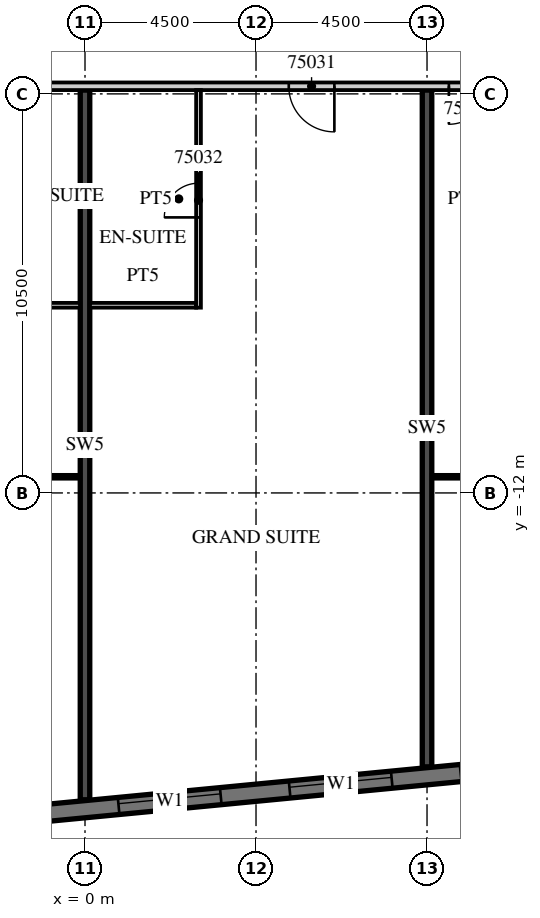
"""IFC4 building model, lengths in metres.
Left out: names, types, materials, properties, quantities, classifications, styles, units other than length and angle.
Written with IfcOpenShell. Run it as: python <this file> out.ifc"""

import sys

from ifc_helpers import new_model, si_unit, direction, frame, frame_2d, origin, place, context, subcontext, project, spatial, rectangle, extrude, element, fill, save


model = new_model("IFC4")
c1 = context("Model", 3, precision=1e-05, world=origin(), true_north=direction((0.0, 1.0)))
c2 = subcontext(c1, "Body", "Model", "MODEL_VIEW")
j1 = project(units=[si_unit("LENGTHUNIT", "METRE"), si_unit("PLANEANGLEUNIT", "RADIAN")], contexts=[c1])
p1 = place(None, origin())
s1 = spatial("IfcSite", under=j1, at=p1, CompositionType="ELEMENT")
p2 = place(p1, origin())
s2 = spatial("IfcBuilding", under=s1, at=p2, CompositionType="ELEMENT")
p3 = place(p2, frame((0.0, 0.0, 298.2)))
s3 = spatial("IfcBuildingStorey", under=s2, at=p3, CompositionType="ELEMENT", Elevation=298.2)
p4 = place(p3, frame((0.0, -20.074, 0.0), z_axis=(0.0, 0.0, 1.0), x_axis=(0.0, 1.0, 0.0)))
e1 = element("IfcWall", 1, at=p4, inside=s3, PredefinedType="SHEAR", context=c2, shape_type="SweptSolid", body=[
    extrude(rectangle(XDim=18.674, YDim=0.25, at=frame_2d((9.337, 0.0))), origin(), (0.0, 0.0, 1.0), 3.3),
])
p5 = place(p3, frame((9.0, -19.207, 0.0), z_axis=(0.0, 0.0, 1.0), x_axis=(0.0, 1.0, 0.0)))
e2 = element("IfcWall", 2, at=p5, inside=s3, PredefinedType="SHEAR", context=c2, shape_type="SweptSolid", body=[
    extrude(rectangle(XDim=17.807, YDim=0.25, at=frame_2d((8.904, 0.0))), origin(), (0.0, 0.0, 1.0), 3.3),
])
p6 = place(p3, frame((-13.521, -21.624, 0.0), z_axis=(0.0, 0.0, 1.0), x_axis=(0.995396186218, 0.095845878695, 0.0)))
e3 = element("IfcWall", 3, at=p6, inside=s3, PredefinedType="SOLIDWALL", context=c2, shape_type="SweptSolid", body=[
    extrude(rectangle(XDim=48.481, YDim=0.45, at=frame_2d((24.241, 0.0))), origin(), (0.0, 0.0, 1.0), 3.02),
])
p7 = place(p6, frame((0.91, 0.0, 0.45)))
e4 = element("IfcOpeningElement", 4, at=p7, cuts=e3, PredefinedType="OPENING", context=c2, shape_type="SweptSolid", body=[
    extrude(rectangle(XDim=2.7, YDim=2.25, at=frame_2d((1.35, 1.125))), frame((0.0, 0.235, 0.0), z_axis=(0.0, -1.0, 0.0), x_axis=(1.0, 0.0, 0.0)), (0.0, 0.0, 1.0), 0.47),
])
p8 = place(p6, frame((5.431, 0.0, 0.45)))
e5 = element("IfcOpeningElement", 5, at=p8, cuts=e3, PredefinedType="OPENING", context=c2, shape_type="SweptSolid", body=[
    extrude(rectangle(XDim=2.7, YDim=2.25, at=frame_2d((1.35, 1.125))), frame((0.0, 0.235, 0.0), z_axis=(0.0, -1.0, 0.0), x_axis=(1.0, 0.0, 0.0)), (0.0, 0.0, 1.0), 0.47),
])
p9 = place(p6, frame((9.952, 0.0, 0.45)))
e6 = element("IfcOpeningElement", 6, at=p9, cuts=e3, PredefinedType="OPENING", context=c2, shape_type="SweptSolid", body=[
    extrude(rectangle(XDim=2.7, YDim=2.25, at=frame_2d((1.35, 1.125))), frame((0.0, 0.235, 0.0), z_axis=(0.0, -1.0, 0.0), x_axis=(1.0, 0.0, 0.0)), (0.0, 0.0, 1.0), 0.47),
])
p10 = place(p6, frame((14.473, 0.0, 0.45)))
e7 = element("IfcOpeningElement", 7, at=p10, cuts=e3, PredefinedType="OPENING", context=c2, shape_type="SweptSolid", body=[
    extrude(rectangle(XDim=2.7, YDim=2.25, at=frame_2d((1.35, 1.125))), frame((0.0, 0.235, 0.0), z_axis=(0.0, -1.0, 0.0), x_axis=(1.0, 0.0, 0.0)), (0.0, 0.0, 1.0), 0.47),
])
p11 = place(p6, frame((18.994, 0.0, 0.45)))
e8 = element("IfcOpeningElement", 8, at=p11, cuts=e3, PredefinedType="OPENING", context=c2, shape_type="SweptSolid", body=[
    extrude(rectangle(XDim=2.7, YDim=2.25, at=frame_2d((1.35, 1.125))), frame((0.0, 0.235, 0.0), z_axis=(0.0, -1.0, 0.0), x_axis=(1.0, 0.0, 0.0)), (0.0, 0.0, 1.0), 0.47),
])
p12 = place(p6, frame((23.514, 0.0, 0.45)))
e9 = element("IfcOpeningElement", 9, at=p12, cuts=e3, PredefinedType="OPENING", context=c2, shape_type="SweptSolid", body=[
    extrude(rectangle(XDim=2.7, YDim=2.25, at=frame_2d((1.35, 1.125))), frame((0.0, 0.235, 0.0), z_axis=(0.0, -1.0, 0.0), x_axis=(1.0, 0.0, 0.0)), (0.0, 0.0, 1.0), 0.47),
])
p13 = place(p6, frame((28.035, 0.0, 0.45)))
e10 = element("IfcOpeningElement", 10, at=p13, cuts=e3, PredefinedType="OPENING", context=c2, shape_type="SweptSolid", body=[
    extrude(rectangle(XDim=2.7, YDim=2.25, at=frame_2d((1.35, 1.125))), frame((0.0, 0.235, 0.0), z_axis=(0.0, -1.0, 0.0), x_axis=(1.0, 0.0, 0.0)), (0.0, 0.0, 1.0), 0.47),
])
p14 = place(p6, frame((32.556, 0.0, 0.45)))
e11 = element("IfcOpeningElement", 11, at=p14, cuts=e3, PredefinedType="OPENING", context=c2, shape_type="SweptSolid", body=[
    extrude(rectangle(XDim=2.7, YDim=2.25, at=frame_2d((1.35, 1.125))), frame((0.0, 0.235, 0.0), z_axis=(0.0, -1.0, 0.0), x_axis=(1.0, 0.0, 0.0)), (0.0, 0.0, 1.0), 0.47),
])
p15 = place(p6, frame((37.077, 0.0, 0.45)))
e12 = element("IfcOpeningElement", 12, at=p15, cuts=e3, PredefinedType="OPENING", context=c2, shape_type="SweptSolid", body=[
    extrude(rectangle(XDim=2.7, YDim=2.25, at=frame_2d((1.35, 1.125))), frame((0.0, 0.235, 0.0), z_axis=(0.0, -1.0, 0.0), x_axis=(1.0, 0.0, 0.0)), (0.0, 0.0, 1.0), 0.47),
])
p16 = place(p6, frame((41.598, 0.0, 0.45)))
e13 = element("IfcOpeningElement", 13, at=p16, cuts=e3, PredefinedType="OPENING", context=c2, shape_type="SweptSolid", body=[
    extrude(rectangle(XDim=2.7, YDim=2.25, at=frame_2d((1.35, 1.125))), frame((0.0, 0.235, 0.0), z_axis=(0.0, -1.0, 0.0), x_axis=(1.0, 0.0, 0.0)), (0.0, 0.0, 1.0), 0.47),
])
p17 = place(p3, frame((-13.5, -1.3, 0.0), z_axis=(0.0, 0.0, 1.0), x_axis=(1.0, 0.0, 0.0)))
e14 = element("IfcWall", 14, at=p17, inside=s3, PredefinedType="PARTITIONING", context=c2, shape_type="SweptSolid", body=[
    extrude(rectangle(XDim=50.293, YDim=0.2, at=frame_2d((25.146, 0.0))), origin(), (0.0, 0.0, 1.0), 3.02),
])
p18 = place(p17, frame((2.925, 0.0, 0.0)))
e15 = element("IfcOpeningElement", 15, at=p18, cuts=e14, PredefinedType="OPENING", context=c2, shape_type="SweptSolid", body=[
    extrude(rectangle(XDim=1.0, YDim=2.1, at=frame_2d((0.5, 1.05))), frame((0.0, 0.11, 0.0), z_axis=(0.0, -1.0, 0.0), x_axis=(1.0, 0.0, 0.0)), (0.0, 0.0, 1.0), 0.22),
])
p19 = place(p17, frame((7.45, 0.0, 0.0)))
e16 = element("IfcOpeningElement", 16, at=p19, cuts=e14, PredefinedType="OPENING", context=c2, shape_type="SweptSolid", body=[
    extrude(rectangle(XDim=1.0, YDim=2.1, at=frame_2d((0.5, 1.05))), frame((0.0, 0.11, 0.0), z_axis=(0.0, -1.0, 0.0), x_axis=(1.0, 0.0, 0.0)), (0.0, 0.0, 1.0), 0.22),
])
p20 = place(p17, frame((9.55, 0.0, 0.0)))
e17 = element("IfcOpeningElement", 17, at=p20, cuts=e14, PredefinedType="OPENING", context=c2, shape_type="SweptSolid", body=[
    extrude(rectangle(XDim=1.0, YDim=2.1, at=frame_2d((0.5, 1.05))), frame((0.0, 0.11, 0.0), z_axis=(0.0, -1.0, 0.0), x_axis=(1.0, 0.0, 0.0)), (0.0, 0.0, 1.0), 0.22),
])
p21 = place(p17, frame((18.862, 0.0, 0.0)))
e18 = element("IfcOpeningElement", 18, at=p21, cuts=e14, PredefinedType="OPENING", context=c2, shape_type="SweptSolid", body=[
    extrude(rectangle(XDim=1.2, YDim=2.1, at=frame_2d((0.6, 1.05))), frame((0.0, 0.11, 0.0), z_axis=(0.0, -1.0, 0.0), x_axis=(1.0, 0.0, 0.0)), (0.0, 0.0, 1.0), 0.22),
])
p22 = place(p17, frame((23.075, 0.0, 0.0)))
e19 = element("IfcOpeningElement", 19, at=p22, cuts=e14, PredefinedType="OPENING", context=c2, shape_type="SweptSolid", body=[
    extrude(rectangle(XDim=1.0, YDim=2.1, at=frame_2d((0.5, 1.05))), frame((0.0, 0.11, 0.0), z_axis=(0.0, -1.0, 0.0), x_axis=(1.0, 0.0, 0.0)), (0.0, 0.0, 1.0), 0.22),
])
p23 = place(p17, frame((29.925, 0.0, 0.0)))
e20 = element("IfcOpeningElement", 20, at=p23, cuts=e14, PredefinedType="OPENING", context=c2, shape_type="SweptSolid", body=[
    extrude(rectangle(XDim=1.0, YDim=2.1, at=frame_2d((0.5, 1.05))), frame((0.0, 0.11, 0.0), z_axis=(0.0, -1.0, 0.0), x_axis=(1.0, 0.0, 0.0)), (0.0, 0.0, 1.0), 0.22),
])
p24 = place(p17, frame((33.938, 0.0, 0.0)))
e21 = element("IfcOpeningElement", 21, at=p24, cuts=e14, PredefinedType="OPENING", context=c2, shape_type="SweptSolid", body=[
    extrude(rectangle(XDim=1.2, YDim=2.1, at=frame_2d((0.6, 1.05))), frame((0.0, 0.11, 0.0), z_axis=(0.0, -1.0, 0.0), x_axis=(1.0, 0.0, 0.0)), (0.0, 0.0, 1.0), 0.22),
])
p25 = place(p17, frame((43.45, 0.0, 0.0)))
e22 = element("IfcOpeningElement", 22, at=p25, cuts=e14, PredefinedType="OPENING", context=c2, shape_type="SweptSolid", body=[
    extrude(rectangle(XDim=1.0, YDim=2.1, at=frame_2d((0.5, 1.05))), frame((0.0, 0.11, 0.0), z_axis=(0.0, -1.0, 0.0), x_axis=(1.0, 0.0, 0.0)), (0.0, 0.0, 1.0), 0.22),
])
p26 = place(p17, frame((45.55, 0.0, 0.0)))
e23 = element("IfcOpeningElement", 23, at=p26, cuts=e14, PredefinedType="OPENING", context=c2, shape_type="SweptSolid", body=[
    extrude(rectangle(XDim=1.0, YDim=2.1, at=frame_2d((0.5, 1.05))), frame((0.0, 0.11, 0.0), z_axis=(0.0, -1.0, 0.0), x_axis=(1.0, 0.0, 0.0)), (0.0, 0.0, 1.0), 0.22),
])
p27 = place(p3, frame((-2.375, -7.062, 0.0), z_axis=(0.0, 0.0, 1.0), x_axis=(1.0, 0.0, 0.0)))
e24 = element("IfcWall", 24, at=p27, inside=s3, PredefinedType="PARTITIONING", context=c2, shape_type="SweptSolid", body=[
    extrude(rectangle(XDim=2.25, YDim=0.125, at=frame_2d((1.125, 0.0))), origin(), (0.0, 0.0, 1.0), 3.02),
])
p28 = place(p3, frame((-4.4, -11.575, 0.0), z_axis=(0.0, 0.0, 1.0), x_axis=(1.0, 0.0, 0.0)))
e25 = element("IfcWall", 25, at=p28, inside=s3, PredefinedType="PARTITIONING", context=c2, shape_type="SweptSolid", body=[
    extrude(rectangle(XDim=4.275, YDim=0.1, at=frame_2d((2.137, 0.0))), origin(), (0.0, 0.0, 1.0), 3.02),
])
p29 = place(p28, frame((1.388, 0.0, 0.0)))
e26 = element("IfcOpeningElement", 26, at=p29, cuts=e25, PredefinedType="OPENING", context=c2, shape_type="SweptSolid", body=[
    extrude(rectangle(XDim=1.5, YDim=2.1, at=frame_2d((0.75, 1.05))), frame((0.0, 0.06, 0.0), z_axis=(0.0, -1.0, 0.0), x_axis=(1.0, 0.0, 0.0)), (0.0, 0.0, 1.0), 0.12),
])
p30 = place(p3, frame((2.987, -7.125, 0.0), z_axis=(0.0, 0.0, 1.0), x_axis=(0.0, 1.0, 0.0)))
e27 = element("IfcWall", 27, at=p30, inside=s3, PredefinedType="PARTITIONING", context=c2, shape_type="SweptSolid", body=[
    extrude(rectangle(XDim=5.725, YDim=0.125, at=frame_2d((2.863, 0.0))), origin(), (0.0, 0.0, 1.0), 3.02),
])
p31 = place(p30, frame((2.375, 0.0, 0.0)))
e28 = element("IfcOpeningElement", 28, at=p31, cuts=e27, PredefinedType="OPENING", context=c2, shape_type="SweptSolid", body=[
    extrude(rectangle(XDim=0.9, YDim=2.1, at=frame_2d((0.45, 1.05))), frame((0.0, 0.073, 0.0), z_axis=(0.0, -1.0, 0.0), x_axis=(1.0, 0.0, 0.0)), (0.0, 0.0, 1.0), 0.145),
])
p32 = place(p3, frame((0.125, -7.062, 0.0), z_axis=(0.0, 0.0, 1.0), x_axis=(1.0, 0.0, 0.0)))
e29 = element("IfcWall", 29, at=p32, inside=s3, PredefinedType="PARTITIONING", context=c2, shape_type="SweptSolid", body=[
    extrude(rectangle(XDim=2.8, YDim=0.125, at=frame_2d((1.4, 0.0))), origin(), (0.0, 0.0, 1.0), 3.02),
])
p33 = place(p3, frame((9.125, -11.575, 0.0), z_axis=(0.0, 0.0, 1.0), x_axis=(1.0, 0.0, 0.0)))
e30 = element("IfcWall", 30, at=p33, inside=s3, PredefinedType="PARTITIONING", context=c2, shape_type="SweptSolid", body=[
    extrude(rectangle(XDim=4.275, YDim=0.1, at=frame_2d((2.137, 0.0))), origin(), (0.0, 0.0, 1.0), 3.02),
])
p34 = place(p33, frame((0.787, 0.0, 0.0)))
e31 = element("IfcOpeningElement", 31, at=p34, cuts=e30, PredefinedType="OPENING", context=c2, shape_type="SweptSolid", body=[
    extrude(rectangle(XDim=1.5, YDim=2.1, at=frame_2d((0.75, 1.05))), frame((0.0, 0.06, 0.0), z_axis=(0.0, -1.0, 0.0), x_axis=(1.0, 0.0, 0.0)), (0.0, 0.0, 1.0), 0.12),
])
p35 = place(p10, origin())
e32 = element("IfcWindow", 32, at=p35, inside=s3, PartitioningType="SINGLE_PANEL", PredefinedType="WINDOW", context=c2, shape_type="SweptSolid", body=[
    extrude(rectangle(XDim=2.7, YDim=2.25, at=frame_2d((1.35, 1.125))), frame((0.0, 0.09, 0.0), z_axis=(0.0, -1.0, 0.0), x_axis=(1.0, 0.0, 0.0)), (0.0, 0.0, 1.0), 0.06),
])
fill(e7, e32)
p36 = place(p11, origin())
e33 = element("IfcWindow", 33, at=p36, inside=s3, PartitioningType="SINGLE_PANEL", PredefinedType="WINDOW", context=c2, shape_type="SweptSolid", body=[
    extrude(rectangle(XDim=2.7, YDim=2.25, at=frame_2d((1.35, 1.125))), frame((0.0, 0.09, 0.0), z_axis=(0.0, -1.0, 0.0), x_axis=(1.0, 0.0, 0.0)), (0.0, 0.0, 1.0), 0.06),
])
fill(e8, e33)
p37 = place(p21, origin())
e34 = element("IfcDoor", 34, at=p37, inside=s3, OperationType="SINGLE_SWING_RIGHT", PredefinedType="DOOR", context=c2, shape_type="SweptSolid", body=[
    extrude(rectangle(XDim=1.2, YDim=2.1, at=frame_2d((0.6, 1.05))), frame((0.0, 0.025, 0.0), z_axis=(0.0, -1.0, 0.0), x_axis=(1.0, 0.0, 0.0)), (0.0, 0.0, 1.0), 0.05),
])
fill(e18, e34)
p38 = place(p31, origin())
e35 = element("IfcDoor", 35, at=p38, inside=s3, OperationType="SINGLE_SWING_LEFT", PredefinedType="DOOR", context=c2, shape_type="SweptSolid", body=[
    extrude(rectangle(XDim=0.9, YDim=2.1, at=frame_2d((0.45, 1.05))), frame((0.0, 0.025, 0.0), z_axis=(0.0, -1.0, 0.0), x_axis=(1.0, 0.0, 0.0)), (0.0, 0.0, 1.0), 0.05),
])
fill(e28, e35)
p39 = place(p22, origin())
e36 = element("IfcDoor", 36, at=p39, inside=s3, OperationType="SINGLE_SWING_LEFT", PredefinedType="DOOR", context=c2, shape_type="SweptSolid", body=[
    extrude(rectangle(XDim=1.0, YDim=2.1, at=frame_2d((0.5, 1.05))), frame((0.0, 0.025, 0.0), z_axis=(0.0, -1.0, 0.0), x_axis=(1.0, 0.0, 0.0)), (0.0, 0.0, 1.0), 0.05),
])
fill(e19, e36)
save(model, sys.argv[1])
